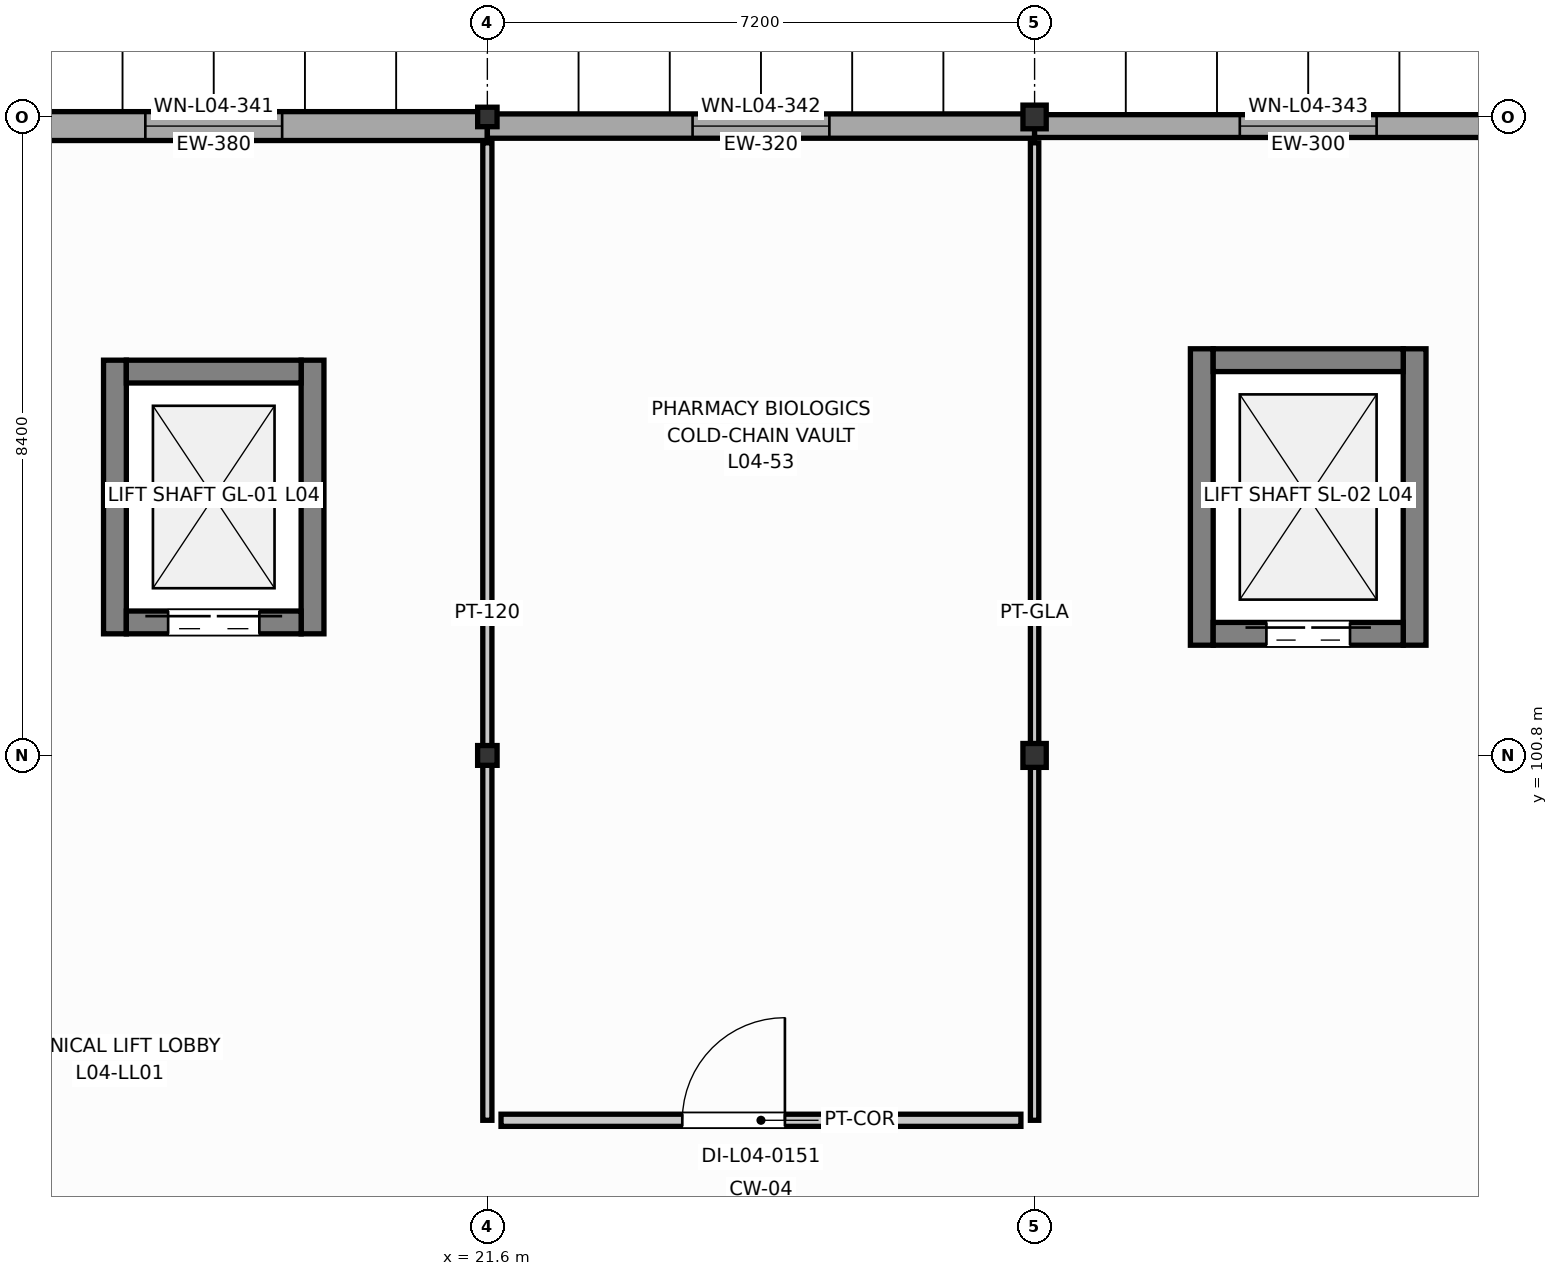
"""IFC4 building model, lengths in metres.
Left out: names, types, materials, properties, quantities, classifications, styles, units other than length and angle.
Written with IfcOpenShell. Run it as: python <this file> out.ifc"""

import sys

from ifc_helpers import new_model, si_unit, direction, frame, frame_2d, origin, origin_2d, place, context, subcontext, project, spatial, rectangle, i_section, extrude, element, fill, save


model = new_model("IFC4")
c1 = context("Model", 3, precision=1e-05, world=origin(), true_north=direction((0.0, 1.0)))
c2 = subcontext(c1, "Body", "Model", "MODEL_VIEW")
j1 = project(units=[si_unit("LENGTHUNIT", "METRE"), si_unit("PLANEANGLEUNIT", "RADIAN")], contexts=[c1])
p1 = place(None, origin())
s1 = spatial("IfcSite", under=j1, at=p1, CompositionType="ELEMENT")
p2 = place(p1, origin())
s2 = spatial("IfcBuilding", under=s1, at=p2, CompositionType="ELEMENT")
p3 = place(p2, frame((0.0, 0.0, 17.4)))
s3 = spatial("IfcBuildingStorey", under=s2, at=p3, CompositionType="ELEMENT", Elevation=17.4)
p4 = place(p3, frame((21.6, 100.8, 0.0), z_axis=(0.0, 0.0, 1.0), x_axis=(1.0, 0.0, 0.0)))
e1 = element("IfcColumn", 1, at=p4, inside=s3, PredefinedType="COLUMN", context=c2, shape_type="SweptSolid", body=[
    extrude(i_section(OverallWidth=0.256, OverallDepth=0.26, WebThickness=0.011, FlangeThickness=0.017, FilletRadius=0.013, at=origin_2d()), origin(), (0.0, 0.0, 1.0), 4.2),
])
p5 = place(p3, frame((21.6, 109.2, 0.0), z_axis=(0.0, 0.0, 1.0), x_axis=(1.0, 0.0, 0.0)))
e2 = element("IfcColumn", 2, at=p5, inside=s3, PredefinedType="COLUMN", context=c2, shape_type="SweptSolid", body=[
    extrude(i_section(OverallWidth=0.255, OverallDepth=0.256, WebThickness=0.01, FlangeThickness=0.016, FilletRadius=0.013, at=origin_2d()), origin(), (0.0, 0.0, 1.0), 4.2),
])
p6 = place(p3, frame((28.8, 100.8, 0.0), z_axis=(0.0, 0.0, 1.0), x_axis=(1.0, 0.0, 0.0)))
e3 = element("IfcColumn", 3, at=p6, inside=s3, PredefinedType="COLUMN", context=c2, shape_type="SweptSolid", body=[
    extrude(i_section(OverallWidth=0.307, OverallDepth=0.314, WebThickness=0.012, FlangeThickness=0.019, FilletRadius=0.016, at=origin_2d()), origin(), (0.0, 0.0, 1.0), 4.2),
])
p7 = place(p3, frame((28.8, 109.2, 0.0), z_axis=(0.0, 0.0, 1.0), x_axis=(1.0, 0.0, 0.0)))
e4 = element("IfcColumn", 4, at=p7, inside=s3, PredefinedType="COLUMN", context=c2, shape_type="SweptSolid", body=[
    extrude(i_section(OverallWidth=0.306, OverallDepth=0.311, WebThickness=0.011, FlangeThickness=0.017, FilletRadius=0.015, at=origin_2d()), origin(), (0.0, 0.0, 1.0), 4.2),
])
for number, where, z_axis, x_axis in (
    (5, (31.0, 102.25, 0.0), (0.0, 0.0, 1.0), (0.0, 1.0, 0.0)),
    (6, (33.8, 102.25, 0.0), (0.0, 0.0, 1.0), (0.0, 1.0, 0.0)),
):
    element("IfcWall", number, at=place(p3, frame(where, z_axis=z_axis, x_axis=x_axis)), inside=s3, PredefinedType="SHEAR", context=c2, shape_type="SweptSolid", body=[
        extrude(rectangle(XDim=3.9, YDim=0.3, at=frame_2d((1.95, 0.0))), origin(), (0.0, 0.0, 1.0), 3.99),
    ])
p8 = place(p3, frame((31.15, 106.0, 0.0), z_axis=(0.0, 0.0, 1.0), x_axis=(1.0, 0.0, 0.0)))
e7 = element("IfcWall", 7, at=p8, inside=s3, PredefinedType="SHEAR", context=c2, shape_type="SweptSolid", body=[
    extrude(rectangle(XDim=2.5, YDim=0.3, at=frame_2d((1.25, 0.0))), origin(), (0.0, 0.0, 1.0), 3.99),
])
p9 = place(p3, frame((31.15, 102.4, 0.0), z_axis=(0.0, 0.0, 1.0), x_axis=(1.0, 0.0, 0.0)))
e8 = element("IfcWall", 8, at=p9, inside=s3, PredefinedType="SHEAR", context=c2, shape_type="SweptSolid", body=[
    extrude(rectangle(XDim=2.5, YDim=0.3, at=frame_2d((1.25, 0.0))), origin(), (0.0, 0.0, 1.0), 3.99),
])
p10 = place(p9, frame((0.7, 0.0, 0.0)))
e9 = element("IfcOpeningElement", 9, at=p10, cuts=e8, PredefinedType="OPENING", context=c2, shape_type="SweptSolid", body=[
    extrude(rectangle(XDim=1.1, YDim=2.15, at=frame_2d((0.55, 1.075))), frame((0.0, 0.16, 0.0), z_axis=(0.0, -1.0, 0.0), x_axis=(1.0, 0.0, 0.0)), (0.0, 0.0, 1.0), 0.32),
])
for number, where, z_axis, x_axis in (
    (10, (16.7, 102.4, 0.0), (0.0, 0.0, 1.0), (0.0, 1.0, 0.0)),
    (11, (19.3, 102.4, 0.0), (0.0, 0.0, 1.0), (0.0, 1.0, 0.0)),
):
    element("IfcWall", number, at=place(p3, frame(where, z_axis=z_axis, x_axis=x_axis)), inside=s3, PredefinedType="SHEAR", context=c2, shape_type="SweptSolid", body=[
        extrude(rectangle(XDim=3.6, YDim=0.3, at=frame_2d((1.8, 0.0))), origin(), (0.0, 0.0, 1.0), 3.975),
    ])
p11 = place(p3, frame((16.85, 105.85, 0.0), z_axis=(0.0, 0.0, 1.0), x_axis=(1.0, 0.0, 0.0)))
e12 = element("IfcWall", 12, at=p11, inside=s3, PredefinedType="SHEAR", context=c2, shape_type="SweptSolid", body=[
    extrude(rectangle(XDim=2.3, YDim=0.3, at=frame_2d((1.15, 0.0))), origin(), (0.0, 0.0, 1.0), 3.975),
])
p12 = place(p3, frame((16.85, 102.55, 0.0), z_axis=(0.0, 0.0, 1.0), x_axis=(1.0, 0.0, 0.0)))
e13 = element("IfcWall", 13, at=p12, inside=s3, PredefinedType="SHEAR", context=c2, shape_type="SweptSolid", body=[
    extrude(rectangle(XDim=2.3, YDim=0.3, at=frame_2d((1.15, 0.0))), origin(), (0.0, 0.0, 1.0), 3.975),
])
p13 = place(p12, frame((0.55, 0.0, 0.0)))
e14 = element("IfcOpeningElement", 14, at=p13, cuts=e13, PredefinedType="OPENING", context=c2, shape_type="SweptSolid", body=[
    extrude(rectangle(XDim=1.2, YDim=2.15, at=frame_2d((0.6, 1.075))), frame((0.0, 0.16, 0.0), z_axis=(0.0, -1.0, 0.0), x_axis=(1.0, 0.0, 0.0)), (0.0, 0.0, 1.0), 0.32),
])
p14 = place(p3, frame((14.4, 109.08, 0.0), z_axis=(0.0, 0.0, 1.0), x_axis=(1.0, 0.0, 0.0)))
e15 = element("IfcWall", 15, at=p14, inside=s3, PredefinedType="SOLIDWALL", context=c2, shape_type="SweptSolid", body=[
    extrude(rectangle(XDim=7.2, YDim=0.38, at=frame_2d((3.6, 0.0))), origin(), (0.0, 0.0, 1.0), 3.482),
])
p15 = place(p14, frame((2.7, 0.0, 0.95)))
e16 = element("IfcOpeningElement", 16, at=p15, cuts=e15, PredefinedType="OPENING", context=c2, shape_type="SweptSolid", body=[
    extrude(rectangle(XDim=1.8, YDim=1.15, at=frame_2d((0.9, 0.575))), frame((0.0, 0.2, 0.0), z_axis=(0.0, -1.0, 0.0), x_axis=(1.0, 0.0, 0.0)), (0.0, 0.0, 1.0), 0.4),
])
p16 = place(p3, frame((21.6, 109.08, 0.0), z_axis=(0.0, 0.0, 1.0), x_axis=(1.0, 0.0, 0.0)))
e17 = element("IfcWall", 17, at=p16, inside=s3, PredefinedType="SOLIDWALL", context=c2, shape_type="SweptSolid", body=[
    extrude(rectangle(XDim=7.2, YDim=0.32, at=frame_2d((3.6, 0.0))), origin(), (0.0, 0.0, 1.0), 3.482),
])
p17 = place(p16, frame((2.7, 0.0, 0.95)))
e18 = element("IfcOpeningElement", 18, at=p17, cuts=e17, PredefinedType="OPENING", context=c2, shape_type="SweptSolid", body=[
    extrude(rectangle(XDim=1.8, YDim=1.35, at=frame_2d((0.9, 0.675))), frame((0.0, 0.17, 0.0), z_axis=(0.0, -1.0, 0.0), x_axis=(1.0, 0.0, 0.0)), (0.0, 0.0, 1.0), 0.34),
])
p18 = place(p3, frame((28.8, 109.08, 0.0), z_axis=(0.0, 0.0, 1.0), x_axis=(1.0, 0.0, 0.0)))
e19 = element("IfcWall", 19, at=p18, inside=s3, PredefinedType="SOLIDWALL", context=c2, shape_type="SweptSolid", body=[
    extrude(rectangle(XDim=7.2, YDim=0.3, at=frame_2d((3.6, 0.0))), origin(), (0.0, 0.0, 1.0), 3.482),
])
p19 = place(p18, frame((2.7, 0.0, 0.95)))
e20 = element("IfcOpeningElement", 20, at=p19, cuts=e19, PredefinedType="OPENING", context=c2, shape_type="SweptSolid", body=[
    extrude(rectangle(XDim=1.8, YDim=1.55, at=frame_2d((0.9, 0.775))), frame((0.0, 0.16, 0.0), z_axis=(0.0, -1.0, 0.0), x_axis=(1.0, 0.0, 0.0)), (0.0, 0.0, 1.0), 0.32),
])
p20 = place(p3, frame((21.6, 96.0, 0.0), z_axis=(0.0, 0.0, 1.0), x_axis=(0.0, 1.0, 0.0)))
e21 = element("IfcWall", 21, at=p20, inside=s3, PredefinedType="PARTITIONING", context=c2, shape_type="SweptSolid", body=[
    extrude(rectangle(XDim=12.86, YDim=0.12, at=frame_2d((6.43, 0.0))), origin(), (0.0, 0.0, 1.0), 3.401),
])
p21 = place(p3, frame((28.8, 108.86, 0.0), z_axis=(0.0, 0.0, 1.0), x_axis=(0.0, -1.0, 0.0)))
e22 = element("IfcWall", 22, at=p21, inside=s3, PredefinedType="MOVABLE", context=c2, shape_type="SweptSolid", body=[
    extrude(rectangle(XDim=12.86, YDim=0.11, at=frame_2d((6.43, 0.0))), origin(), (0.0, 0.0, 1.0), 3.479),
])
p22 = place(p3, frame((28.62, 96.0, 0.0), z_axis=(0.0, 0.0, 1.0), x_axis=(-1.0, 0.0, 0.0)))
e23 = element("IfcWall", 23, at=p22, inside=s3, PredefinedType="PARTITIONING", context=c2, shape_type="SweptSolid", body=[
    extrude(rectangle(XDim=6.84, YDim=0.16, at=frame_2d((3.42, 0.0))), origin(), (0.0, 0.0, 1.0), 3.945),
])
p23 = place(p22, frame((3.105, 0.0, 0.0)))
e24 = element("IfcOpeningElement", 24, at=p23, cuts=e23, PredefinedType="OPENING", context=c2, shape_type="SweptSolid", body=[
    extrude(rectangle(XDim=1.35, YDim=2.15, at=frame_2d((0.675, 1.075))), frame((0.0, 0.09, 0.0), z_axis=(0.0, -1.0, 0.0), x_axis=(1.0, 0.0, 0.0)), (0.0, 0.0, 1.0), 0.18),
])
p24 = place(p10, origin())
e25 = element("IfcDoor", 25, at=p24, inside=s3, OperationType="DOUBLE_DOOR_SLIDING", PredefinedType="DOOR", context=c2, shape_type="SweptSolid", body=[
    extrude(rectangle(XDim=1.1, YDim=2.15, at=frame_2d((0.55, 1.075))), frame((0.0, 0.025, 0.0), z_axis=(0.0, -1.0, 0.0), x_axis=(1.0, 0.0, 0.0)), (0.0, 0.0, 1.0), 0.05),
])
fill(e9, e25)
p25 = place(p13, origin())
e26 = element("IfcDoor", 26, at=p25, inside=s3, OperationType="DOUBLE_DOOR_SLIDING", PredefinedType="DOOR", context=c2, shape_type="SweptSolid", body=[
    extrude(rectangle(XDim=1.2, YDim=2.15, at=frame_2d((0.6, 1.075))), frame((0.0, 0.025, 0.0), z_axis=(0.0, -1.0, 0.0), x_axis=(1.0, 0.0, 0.0)), (0.0, 0.0, 1.0), 0.05),
])
fill(e14, e26)
p26 = place(p15, origin())
e27 = element("IfcWindow", 27, at=p26, inside=s3, PartitioningType="SINGLE_PANEL", PredefinedType="WINDOW", context=c2, shape_type="SweptSolid", body=[
    extrude(rectangle(XDim=1.8, YDim=1.15, at=frame_2d((0.9, 0.575))), frame((0.0, 0.03, 0.0), z_axis=(0.0, -1.0, 0.0), x_axis=(1.0, 0.0, 0.0)), (0.0, 0.0, 1.0), 0.06),
])
fill(e16, e27)
p27 = place(p17, origin())
e28 = element("IfcWindow", 28, at=p27, inside=s3, PartitioningType="SINGLE_PANEL", PredefinedType="WINDOW", context=c2, shape_type="SweptSolid", body=[
    extrude(rectangle(XDim=1.8, YDim=1.35, at=frame_2d((0.9, 0.675))), frame((0.0, 0.03, 0.0), z_axis=(0.0, -1.0, 0.0), x_axis=(1.0, 0.0, 0.0)), (0.0, 0.0, 1.0), 0.06),
])
fill(e18, e28)
p28 = place(p19, origin())
e29 = element("IfcWindow", 29, at=p28, inside=s3, PartitioningType="SINGLE_PANEL", PredefinedType="WINDOW", context=c2, shape_type="SweptSolid", body=[
    extrude(rectangle(XDim=1.8, YDim=1.55, at=frame_2d((0.9, 0.775))), frame((0.0, 0.03, 0.0), z_axis=(0.0, -1.0, 0.0), x_axis=(1.0, 0.0, 0.0)), (0.0, 0.0, 1.0), 0.06),
])
fill(e20, e29)
p29 = place(p23, frame((1.35, 0.0, 0.0), z_axis=(0.0, 0.0, 1.0), x_axis=(-1.0, 0.0, 0.0)))
e30 = element("IfcDoor", 30, at=p29, inside=s3, OperationType="SINGLE_SWING_RIGHT", PredefinedType="DOOR", context=c2, shape_type="SweptSolid", body=[
    extrude(rectangle(XDim=1.35, YDim=2.15, at=frame_2d((0.675, 1.075))), frame((0.0, 0.025, 0.0), z_axis=(0.0, -1.0, 0.0), x_axis=(1.0, 0.0, 0.0)), (0.0, 0.0, 1.0), 0.05),
])
fill(e24, e30)
save(model, sys.argv[1])
